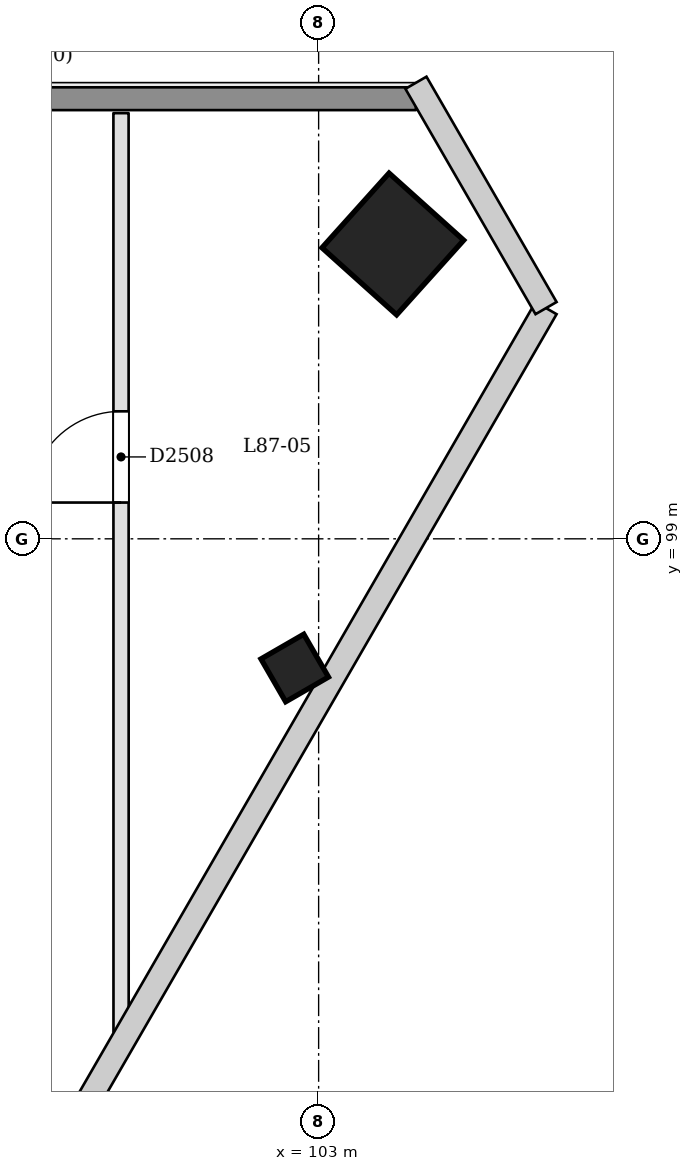
"""IFC4 building model, lengths in metres.
Left out: names, types, materials, properties, quantities, classifications, styles, units other than length and angle.
Written with IfcOpenShell. Run it as: python <this file> out.ifc"""

import sys

from ifc_helpers import new_model, si_unit, direction, frame, frame_2d, origin, origin_2d, place, context, subcontext, project, spatial, rectangle, extrude, element, fill, save


model = new_model("IFC4")
c1 = context("Model", 3, precision=1e-05, world=origin(), true_north=direction((0.0, 1.0)))
c2 = subcontext(c1, "Body", "Model", "MODEL_VIEW")
j1 = project(units=[si_unit("LENGTHUNIT", "METRE"), si_unit("PLANEANGLEUNIT", "RADIAN")], contexts=[c1])
p1 = place(None, origin())
s1 = spatial("IfcSite", under=j1, at=p1, CompositionType="ELEMENT")
p2 = place(p1, origin())
s2 = spatial("IfcBuilding", under=s1, at=p2, CompositionType="ELEMENT")
p3 = place(p2, frame((0.0, 0.0, 334.6)))
s3 = spatial("IfcBuildingStorey", under=s2, at=p3, CompositionType="ELEMENT", Elevation=334.6)
p4 = place(p3, frame((104.01, 102.868, 0.0), z_axis=(-0.028412585289, 0.009238447977, 0.999553588396), x_axis=(0.50030881159, -0.865561841167, 0.022221434727)))
e1 = element("IfcColumn", 1, at=p4, inside=s3, PredefinedType="COLUMN", context=c2, shape_type="SweptSolid", body=[
    extrude(rectangle(XDim=1.32, YDim=1.32, at=origin_2d()), origin(), (0.0, 0.0, 1.0), 4.202),
])
p5 = place(p3, frame((102.713, 97.254, -0.02), z_axis=(-0.022183545815, 0.038443736465, 0.999014499105), x_axis=(-0.500455612122, -0.865477721893, 0.022192187878)))
e2 = element("IfcColumn", 2, at=p5, inside=s3, PredefinedType="COLUMN", context=c2, shape_type="SweptSolid", body=[
    extrude(rectangle(XDim=0.65, YDim=0.65, at=origin_2d()), origin(), (0.0, 0.0, 1.0), 4.204),
])
p6 = place(p3, frame((100.401, 92.511, 0.0), z_axis=(0.0, 0.0, 1.0), x_axis=(-8.0781969e-05, 0.999999996737, 0.0)))
e3 = element("IfcWall", 3, at=p6, inside=s3, PredefinedType="PARTITIONING", context=c2, shape_type="SweptSolid", body=[
    extrude(rectangle(XDim=12.089, YDim=0.2, at=frame_2d((6.044, 0.0))), origin(), (0.0, 0.0, 1.0), 3.9),
])
p7 = place(p6, frame((6.966, 0.0, 0.0)))
e4 = element("IfcOpeningElement", 4, at=p7, cuts=e3, PredefinedType="OPENING", context=c2, shape_type="SweptSolid", body=[
    extrude(rectangle(XDim=1.2, YDim=2.4, at=frame_2d((0.6, 1.2))), frame((0.0, 0.11, 0.0), z_axis=(0.0, -1.0, 0.0), x_axis=(1.0, 0.0, 0.0)), (0.0, 0.0, 1.0), 0.221),
])
p8 = place(p3, frame((65.72, 104.79, 0.0), z_axis=(0.0, 0.0, 1.0), x_axis=(1.0, 0.0, 0.0)))
e5 = element("IfcWall", 5, at=p8, inside=s3, PredefinedType="SOLIDWALL", context=c2, shape_type="SweptSolid", body=[
    extrude(rectangle(XDim=38.561, YDim=0.3, at=frame_2d((19.28, 0.0))), origin(), (0.0, 0.0, 1.0), 3.9),
])
p9 = place(p7, origin())
e6 = element("IfcDoor", 6, at=p9, inside=s3, OperationType="SINGLE_SWING_LEFT", PredefinedType="NOTDEFINED", context=c2, shape_type="SweptSolid", body=[
    extrude(rectangle(XDim=1.2, YDim=2.4, at=frame_2d((0.6, 1.2))), frame((0.0, 0.025, 0.0), z_axis=(0.0, -1.0, 0.0), x_axis=(1.0, 0.0, 0.0)), (0.0, 0.0, 1.0), 0.05),
])
fill(e4, e6)
save(model, sys.argv[1])
